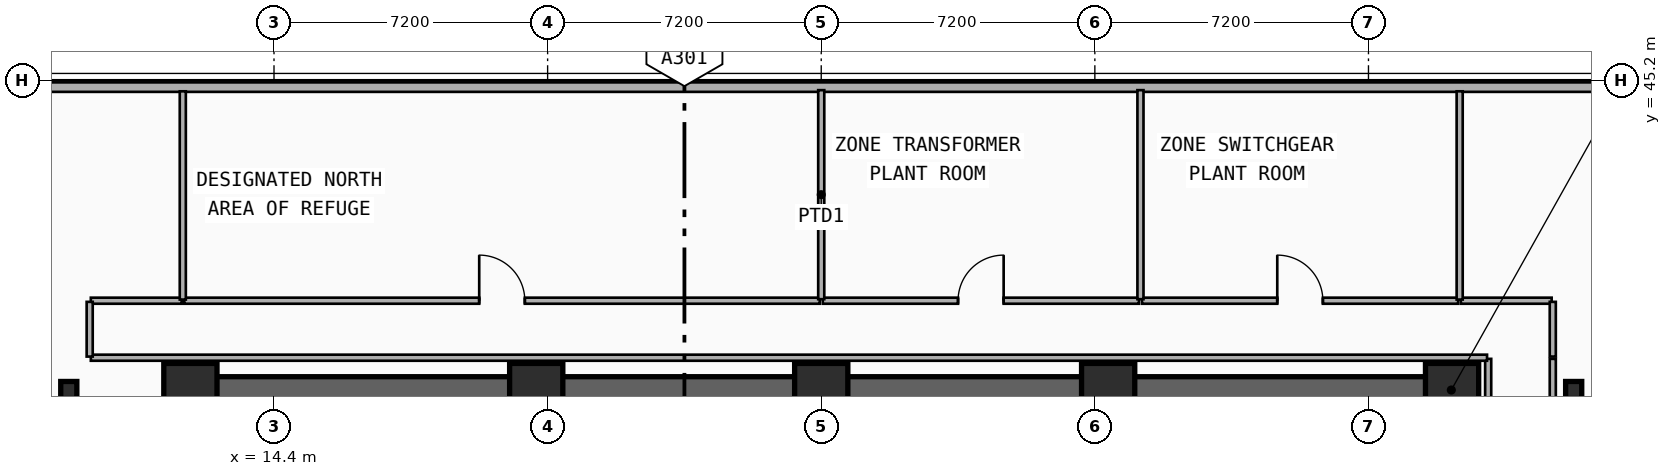
"""IFC4 building model, lengths in metres.
Left out: names, types, materials, properties, quantities, classifications, styles, units other than length and angle.
Written with IfcOpenShell. Run it as: python <this file> out.ifc"""

import sys

from ifc_helpers import new_model, si_unit, direction, frame, frame_2d, origin, origin_2d, place, context, subcontext, project, spatial, rectangle, i_section, extrude, element, fill, save


model = new_model("IFC4")
c1 = context("Model", 3, precision=1e-05, world=origin(), true_north=direction((0.0, 1.0)))
c2 = subcontext(c1, "Body", "Model", "MODEL_VIEW")
j1 = project(units=[si_unit("LENGTHUNIT", "METRE"), si_unit("PLANEANGLEUNIT", "RADIAN")], contexts=[c1])
p1 = place(None, origin())
s1 = spatial("IfcSite", under=j1, at=p1, CompositionType="ELEMENT")
p2 = place(p1, origin())
s2 = spatial("IfcBuilding", under=s1, at=p2, CompositionType="ELEMENT")
p3 = place(p2, frame((0.0, 0.0, 74.5)))
s3 = spatial("IfcBuildingStorey", under=s2, at=p3, CompositionType="ELEMENT", Elevation=74.5)
p4 = place(p3, frame((12.15, 37.05, 0.0), z_axis=(0.0, 0.0, 1.0), x_axis=(1.0, 0.0, 0.0)))
e1 = element("IfcWall", 1, at=p4, inside=s3, PredefinedType="SHEAR", context=c2, shape_type="SweptSolid", body=[
    extrude(rectangle(XDim=33.23, YDim=0.7, at=frame_2d((16.615, 0.0))), origin(), (0.0, 0.0, 1.0), 4.8),
])
for number, where, z_axis, x_axis in (
    (2, (12.2, 37.05, 0.0), (0.0, 0.0, 1.0), (1.0, 0.0, 0.0)),
    (3, (21.3, 37.05, 0.0), (0.0, 0.0, 1.0), (1.0, 0.0, 0.0)),
    (4, (28.8, 37.05, 0.0), (0.0, 0.0, 1.0), (1.0, 0.0, 0.0)),
    (5, (36.35, 37.05, 0.0), (0.0, 0.0, 1.0), (1.0, 0.0, 0.0)),
    (6, (45.4, 37.05, 0.0), (0.0, 0.0, 1.0), (1.0, 0.0, 0.0)),
):
    element("IfcColumn", number, at=place(p3, frame(where, z_axis=z_axis, x_axis=x_axis)), inside=s3, PredefinedType="COLUMN", context=c2, shape_type="SweptSolid", body=[
        extrude(rectangle(XDim=1.4, YDim=1.4, at=origin_2d()), origin(), (0.0, 0.0, 1.0), 4.8),
    ])
for number, where, z_axis, x_axis in (
    (7, (9.0, 37.05, 0.0), (0.0, 0.0, 1.0), (1.0, 0.0, 0.0)),
    (8, (48.6, 37.05, 0.0), (0.0, 0.0, 1.0), (1.0, 0.0, 0.0)),
):
    element("IfcColumn", number, at=place(p3, frame(where, z_axis=z_axis, x_axis=x_axis)), inside=s3, PredefinedType="COLUMN", context=c2, shape_type="SweptSolid", body=[
        extrude(i_section(OverallWidth=0.424, OverallDepth=0.45, WebThickness=0.041, FlangeThickness=0.065, FilletRadius=0.015, at=origin_2d()), origin(), (0.0, 0.0, 1.0), 4.8),
    ])
p5 = place(p3, frame((4.2, 45.02, 0.0), z_axis=(0.0, 0.0, 1.0), x_axis=(1.0, 0.0, 0.0)))
e9 = element("IfcWall", 9, at=p5, inside=s3, PredefinedType="SOLIDWALL", context=c2, shape_type="SweptSolid", body=[
    extrude(rectangle(XDim=49.2, YDim=0.25, at=frame_2d((24.6, 0.0))), origin(), (0.0, 0.0, 1.0), 4.48),
])
p6 = place(p3, frame((12.04, 39.4, 0.0), z_axis=(0.0, 0.0, 1.0), x_axis=(1.0, 0.0, 0.0)))
e10 = element("IfcWall", 10, at=p6, inside=s3, PredefinedType="PARTITIONING", context=c2, shape_type="SweptSolid", body=[
    extrude(rectangle(XDim=16.72, YDim=0.16, at=frame_2d((8.36, 0.0))), origin(), (0.0, 0.0, 1.0), 4.48),
])
p7 = place(p6, frame((7.76, 0.0, 0.0)))
e11 = element("IfcOpeningElement", 11, at=p7, cuts=e10, PredefinedType="OPENING", context=c2, shape_type="SweptSolid", body=[
    extrude(rectangle(XDim=1.2, YDim=2.15, at=frame_2d((0.6, 1.075))), frame((0.0, 0.09, 0.0), z_axis=(0.0, -1.0, 0.0), x_axis=(1.0, 0.0, 0.0)), (0.0, 0.0, 1.0), 0.18),
])
p8 = place(p3, frame((28.84, 39.4, 0.0), z_axis=(0.0, 0.0, 1.0), x_axis=(1.0, 0.0, 0.0)))
e12 = element("IfcWall", 12, at=p8, inside=s3, PredefinedType="PARTITIONING", context=c2, shape_type="SweptSolid", body=[
    extrude(rectangle(XDim=8.32, YDim=0.16, at=frame_2d((4.16, 0.0))), origin(), (0.0, 0.0, 1.0), 4.48),
])
p9 = place(p8, frame((3.56, 0.0, 0.0)))
e13 = element("IfcOpeningElement", 13, at=p9, cuts=e12, PredefinedType="OPENING", context=c2, shape_type="SweptSolid", body=[
    extrude(rectangle(XDim=1.2, YDim=2.15, at=frame_2d((0.6, 1.075))), frame((0.0, 0.09, 0.0), z_axis=(0.0, -1.0, 0.0), x_axis=(1.0, 0.0, 0.0)), (0.0, 0.0, 1.0), 0.18),
])
p10 = place(p3, frame((37.24, 39.4, 0.0), z_axis=(0.0, 0.0, 1.0), x_axis=(1.0, 0.0, 0.0)))
e14 = element("IfcWall", 14, at=p10, inside=s3, PredefinedType="PARTITIONING", context=c2, shape_type="SweptSolid", body=[
    extrude(rectangle(XDim=8.32, YDim=0.16, at=frame_2d((4.16, 0.0))), origin(), (0.0, 0.0, 1.0), 4.48),
])
p11 = place(p10, frame((3.56, 0.0, 0.0)))
e15 = element("IfcOpeningElement", 15, at=p11, cuts=e14, PredefinedType="OPENING", context=c2, shape_type="SweptSolid", body=[
    extrude(rectangle(XDim=1.2, YDim=2.15, at=frame_2d((0.6, 1.075))), frame((0.0, 0.09, 0.0), z_axis=(0.0, -1.0, 0.0), x_axis=(1.0, 0.0, 0.0)), (0.0, 0.0, 1.0), 0.18),
])
for number, where, z_axis, x_axis in (
    (16, (28.8, 39.44, 0.0), (0.0, 0.0, 1.0), (0.0, 1.0, 0.0)),
    (17, (37.2, 39.44, 0.0), (0.0, 0.0, 1.0), (0.0, 1.0, 0.0)),
):
    element("IfcWall", number, at=place(p3, frame(where, z_axis=z_axis, x_axis=x_axis)), inside=s3, PredefinedType="PARTITIONING", context=c2, shape_type="SweptSolid", body=[
        extrude(rectangle(XDim=5.5, YDim=0.16, at=frame_2d((2.75, 0.0))), origin(), (0.0, 0.0, 1.0), 4.48),
    ])
for number, where, z_axis, x_axis in (
    (18, (46.35, 27.63, 0.0), (0.0, 0.0, 1.0), (0.0, 1.0, 0.0)),
    (19, (48.05, 27.63, 0.0), (0.0, 0.0, 1.0), (0.0, 1.0, 0.0)),
):
    element("IfcWall", number, at=place(p3, frame(where, z_axis=z_axis, x_axis=x_axis)), inside=s3, PredefinedType="PARTITIONING", context=c2, shape_type="SweptSolid", body=[
        extrude(rectangle(XDim=10.24, YDim=0.16, at=frame_2d((5.12, 0.0))), origin(), (0.0, 0.0, 1.0), 3.96),
    ])
p12 = place(p3, frame((9.58, 37.9, 0.0), z_axis=(0.0, 0.0, 1.0), x_axis=(1.0, 0.0, 0.0)))
e20 = element("IfcWall", 20, at=p12, inside=s3, PredefinedType="PARTITIONING", context=c2, shape_type="SweptSolid", body=[
    extrude(rectangle(XDim=36.74, YDim=0.16, at=frame_2d((18.37, 0.0))), origin(), (0.0, 0.0, 1.0), 4.48),
])
p13 = place(p3, frame((9.58, 39.4, 0.0), z_axis=(0.0, 0.0, 1.0), x_axis=(1.0, 0.0, 0.0)))
e21 = element("IfcWall", 21, at=p13, inside=s3, PredefinedType="PARTITIONING", context=c2, shape_type="SweptSolid", body=[
    extrude(rectangle(XDim=2.39, YDim=0.16, at=frame_2d((1.195, 0.0))), origin(), (0.0, 0.0, 1.0), 4.48),
])
p14 = place(p3, frame((45.63, 39.4, 0.0), z_axis=(0.0, 0.0, 1.0), x_axis=(1.0, 0.0, 0.0)))
e22 = element("IfcWall", 22, at=p14, inside=s3, PredefinedType="PARTITIONING", context=c2, shape_type="SweptSolid", body=[
    extrude(rectangle(XDim=2.39, YDim=0.16, at=frame_2d((1.195, 0.0))), origin(), (0.0, 0.0, 1.0), 4.48),
])
for number, where, z_axis, x_axis in (
    (23, (9.55, 37.93, 0.0), (0.0, 0.0, 1.0), (0.0, 1.0, 0.0)),
    (24, (48.05, 37.93, 0.0), (0.0, 0.0, 1.0), (0.0, 1.0, 0.0)),
):
    element("IfcWall", number, at=place(p3, frame(where, z_axis=z_axis, x_axis=x_axis)), inside=s3, PredefinedType="PARTITIONING", context=c2, shape_type="SweptSolid", body=[
        extrude(rectangle(XDim=1.44, YDim=0.16, at=frame_2d((0.72, 0.0))), origin(), (0.0, 0.0, 1.0), 4.48),
    ])
for number, where, z_axis, x_axis in (
    (25, (12.0, 39.43, 0.0), (0.0, 0.0, 1.0), (0.0, 1.0, 0.0)),
    (26, (45.6, 39.43, 0.0), (0.0, 0.0, 1.0), (0.0, 1.0, 0.0)),
):
    element("IfcWall", number, at=place(p3, frame(where, z_axis=z_axis, x_axis=x_axis)), inside=s3, PredefinedType="PARTITIONING", context=c2, shape_type="SweptSolid", body=[
        extrude(rectangle(XDim=5.48, YDim=0.16, at=frame_2d((2.74, 0.0))), origin(), (0.0, 0.0, 1.0), 4.48),
    ])
p15 = place(p7, origin())
e27 = element("IfcDoor", 27, at=p15, inside=s3, OperationType="SINGLE_SWING_LEFT", PredefinedType="DOOR", context=c2, shape_type="SweptSolid", body=[
    extrude(rectangle(XDim=1.2, YDim=2.15, at=frame_2d((0.6, 1.075))), frame((0.0, 0.025, 0.0), z_axis=(0.0, -1.0, 0.0), x_axis=(1.0, 0.0, 0.0)), (0.0, 0.0, 1.0), 0.05),
])
fill(e11, e27)
p16 = place(p9, origin())
e28 = element("IfcDoor", 28, at=p16, inside=s3, OperationType="SINGLE_SWING_RIGHT", PredefinedType="DOOR", context=c2, shape_type="SweptSolid", body=[
    extrude(rectangle(XDim=1.2, YDim=2.15, at=frame_2d((0.6, 1.075))), frame((0.0, 0.025, 0.0), z_axis=(0.0, -1.0, 0.0), x_axis=(1.0, 0.0, 0.0)), (0.0, 0.0, 1.0), 0.05),
])
fill(e13, e28)
p17 = place(p11, origin())
e29 = element("IfcDoor", 29, at=p17, inside=s3, OperationType="SINGLE_SWING_LEFT", PredefinedType="DOOR", context=c2, shape_type="SweptSolid", body=[
    extrude(rectangle(XDim=1.2, YDim=2.15, at=frame_2d((0.6, 1.075))), frame((0.0, 0.025, 0.0), z_axis=(0.0, -1.0, 0.0), x_axis=(1.0, 0.0, 0.0)), (0.0, 0.0, 1.0), 0.05),
])
fill(e15, e29)
save(model, sys.argv[1])
